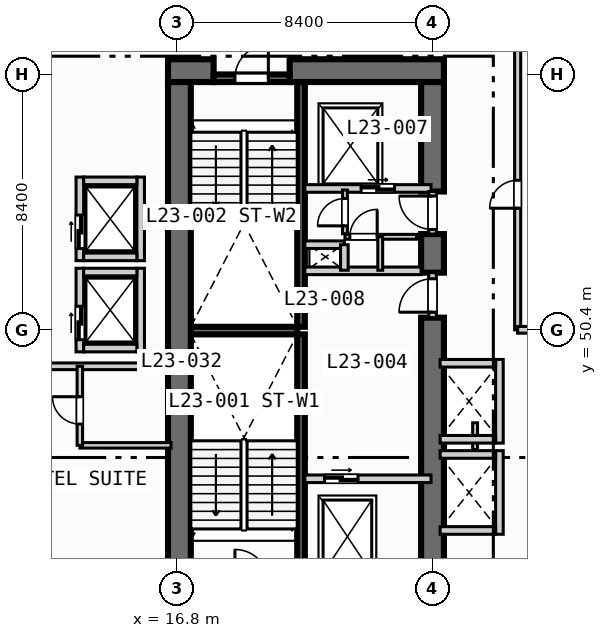
"""IFC4 building model, lengths in metres.
Left out: names, types, materials, properties, quantities, classifications, styles, units other than length and angle.
Written with IfcOpenShell. Run it as: python <this file> out.ifc"""

import sys

from ifc_helpers import new_model, si_unit, direction, frame, frame_2d, origin, place, context, subcontext, project, spatial, rectangle, extrude, element, fill, save


model = new_model("IFC4")
c1 = context("Model", 3, precision=1e-05, world=origin(), true_north=direction((0.0, 1.0)))
c2 = subcontext(c1, "Body", "Model", "MODEL_VIEW")
j1 = project(units=[si_unit("LENGTHUNIT", "METRE"), si_unit("PLANEANGLEUNIT", "RADIAN")], contexts=[c1])
p1 = place(None, origin())
s1 = spatial("IfcSite", under=j1, at=p1, CompositionType="ELEMENT")
p2 = place(p1, origin())
s2 = spatial("IfcBuilding", under=s1, at=p2, CompositionType="ELEMENT")
p3 = place(p2, frame((0.0, 0.0, 100.0)))
s3 = spatial("IfcBuildingStorey", under=s2, at=p3, CompositionType="ELEMENT", Elevation=100.0)
for number, where, z_axis, x_axis in (
    (1, (20.875, 42.2, 0.0), (0.0, 0.0, 1.0), (0.0, 1.0, 0.0)),
    (2, (20.875, 50.5, 0.0), (0.0, 0.0, 1.0), (0.0, 1.0, 0.0)),
):
    element("IfcWall", number, at=place(p3, frame(where, z_axis=z_axis, x_axis=x_axis)), inside=s3, PredefinedType="SOLIDWALL", context=c2, shape_type="SweptSolid", body=[
        extrude(rectangle(XDim=8.05, YDim=0.25, at=frame_2d((4.025, 0.0))), origin(), (0.0, 0.0, 1.0), 3.55),
    ])
p4 = place(p3, frame((17.25, 50.375, 0.0), z_axis=(0.0, 0.0, 1.0), x_axis=(1.0, 0.0, 0.0)))
e3 = element("IfcWall", 3, at=p4, inside=s3, PredefinedType="SOLIDWALL", context=c2, shape_type="SweptSolid", body=[
    extrude(rectangle(XDim=3.5, YDim=0.25, at=frame_2d((1.75, 0.0))), origin(), (0.0, 0.0, 1.0), 3.55),
])
p5 = place(p3, frame((16.5, 58.925, 0.0), z_axis=(0.0, 0.0, 1.0), x_axis=(1.0, 0.0, 0.0)))
e4 = element("IfcWall", 4, at=p5, inside=s3, PredefinedType="SHEAR", context=c2, shape_type="SweptSolid", body=[
    extrude(rectangle(XDim=1.5, YDim=0.75, at=frame_2d((0.75, 0.0))), origin(), (0.0, 0.0, 1.0), 3.55),
])
p6 = place(p3, frame((20.5, 58.925, 0.0), z_axis=(0.0, 0.0, 1.0), x_axis=(1.0, 0.0, 0.0)))
e5 = element("IfcWall", 5, at=p6, inside=s3, PredefinedType="SHEAR", context=c2, shape_type="SweptSolid", body=[
    extrude(rectangle(XDim=5.075, YDim=0.75, at=frame_2d((2.538, 0.0))), origin(), (0.0, 0.0, 1.0), 3.55),
])
p7 = place(p3, frame((16.875, 42.2, 0.0), z_axis=(0.0, 0.0, 1.0), x_axis=(0.0, 1.0, 0.0)))
e6 = element("IfcWall", 6, at=p7, inside=s3, PredefinedType="SHEAR", context=c2, shape_type="SweptSolid", body=[
    extrude(rectangle(XDim=16.35, YDim=0.75, at=frame_2d((8.175, 0.0))), origin(), (0.0, 0.0, 1.0), 3.55),
])
p8 = place(p3, frame((25.2, 42.2, 0.0), z_axis=(0.0, 0.0, 1.0), x_axis=(0.0, 1.0, 0.0)))
e7 = element("IfcWall", 7, at=p8, inside=s3, PredefinedType="SHEAR", context=c2, shape_type="SweptSolid", body=[
    extrude(rectangle(XDim=8.6, YDim=0.75, at=frame_2d((4.3, 0.0))), origin(), (0.0, 0.0, 1.0), 3.55),
])
p9 = place(p3, frame((25.2, 52.28, 0.0), z_axis=(0.0, 0.0, 1.0), x_axis=(0.0, 1.0, 0.0)))
e8 = element("IfcWall", 8, at=p9, inside=s3, PredefinedType="SHEAR", context=c2, shape_type="SweptSolid", body=[
    extrude(rectangle(XDim=1.27, YDim=0.75, at=frame_2d((0.635, 0.0))), origin(), (0.0, 0.0, 1.0), 3.55),
])
p10 = place(p3, frame((25.2, 54.95, 0.0), z_axis=(0.0, 0.0, 1.0), x_axis=(0.0, 1.0, 0.0)))
e9 = element("IfcWall", 9, at=p10, inside=s3, PredefinedType="SHEAR", context=c2, shape_type="SweptSolid", body=[
    extrude(rectangle(XDim=3.6, YDim=0.75, at=frame_2d((1.8, 0.0))), origin(), (0.0, 0.0, 1.0), 3.55),
])
p11 = place(p3, frame((18.0, 58.675, 0.0), z_axis=(0.0, 0.0, 1.0), x_axis=(1.0, 0.0, 0.0)))
e10 = element("IfcWall", 10, at=p11, inside=s3, PredefinedType="SOLIDWALL", context=c2, shape_type="SweptSolid", body=[
    extrude(rectangle(XDim=2.5, YDim=0.25, at=frame_2d((1.25, 0.0))), origin(), (0.0, 0.0, 1.0), 3.55),
])
p12 = place(p11, frame((0.7, 0.0, 0.0)))
e11 = element("IfcOpeningElement", 11, at=p12, cuts=e10, PredefinedType="OPENING", context=c2, shape_type="SweptSolid", body=[
    extrude(rectangle(XDim=1.1, YDim=2.15, at=frame_2d((0.55, 1.075))), frame((0.0, 0.135, 0.0), z_axis=(0.0, -1.0, 0.0), x_axis=(1.0, 0.0, 0.0)), (0.0, 0.0, 1.0), 0.27),
])
p13 = place(p3, frame((21.0, 45.5, 0.0), z_axis=(0.0, 0.0, 1.0), x_axis=(1.0, 0.0, 0.0)))
e12 = element("IfcWall", 12, at=p13, inside=s3, PredefinedType="SOLIDWALL", context=c2, shape_type="SweptSolid", body=[
    extrude(rectangle(XDim=4.15, YDim=0.25, at=frame_2d((2.075, 0.0))), origin(), (0.0, 0.0, 1.0), 3.55),
])
p14 = place(p13, frame((0.65, 0.0, 0.0)))
e13 = element("IfcOpeningElement", 13, at=p14, cuts=e12, PredefinedType="OPENING", context=c2, shape_type="SweptSolid", body=[
    extrude(rectangle(XDim=1.1, YDim=2.15, at=frame_2d((0.55, 1.075))), frame((0.0, 0.135, 0.0), z_axis=(0.0, -1.0, 0.0), x_axis=(1.0, 0.0, 0.0)), (0.0, 0.0, 1.0), 0.27),
])
p15 = place(p3, frame((25.2, 50.8, 0.0), z_axis=(0.0, 0.0, 1.0), x_axis=(0.0, 1.0, 0.0)))
e14 = element("IfcWall", 14, at=p15, inside=s3, PredefinedType="SOLIDWALL", context=c2, shape_type="SweptSolid", body=[
    extrude(rectangle(XDim=1.48, YDim=0.25, at=frame_2d((0.74, 0.0))), origin(), (0.0, 0.0, 1.0), 3.55),
])
p16 = place(p15, frame((0.18, 0.0, 0.0)))
e15 = element("IfcOpeningElement", 15, at=p16, cuts=e14, PredefinedType="OPENING", context=c2, shape_type="SweptSolid", body=[
    extrude(rectangle(XDim=1.1, YDim=2.15, at=frame_2d((0.55, 1.075))), frame((0.0, 0.135, 0.0), z_axis=(0.0, -1.0, 0.0), x_axis=(1.0, 0.0, 0.0)), (0.0, 0.0, 1.0), 0.27),
])
p17 = place(p3, frame((21.0, 52.34, 0.0), z_axis=(0.0, 0.0, 1.0), x_axis=(1.0, 0.0, 0.0)))
e16 = element("IfcWall", 16, at=p17, inside=s3, PredefinedType="SOLIDWALL", context=c2, shape_type="SweptSolid", body=[
    extrude(rectangle(XDim=3.825, YDim=0.25, at=frame_2d((1.913, 0.0))), origin(), (0.0, 0.0, 1.0), 3.55),
])
p18 = place(p3, frame((21.0, 55.05, 0.0), z_axis=(0.0, 0.0, 1.0), x_axis=(1.0, 0.0, 0.0)))
e17 = element("IfcWall", 17, at=p18, inside=s3, PredefinedType="SOLIDWALL", context=c2, shape_type="SweptSolid", body=[
    extrude(rectangle(XDim=4.15, YDim=0.25, at=frame_2d((2.075, 0.0))), origin(), (0.0, 0.0, 1.0), 3.55),
])
p19 = place(p18, frame((1.85, 0.0, 0.0)))
e18 = element("IfcOpeningElement", 18, at=p19, cuts=e17, PredefinedType="OPENING", context=c2, shape_type="SweptSolid", body=[
    extrude(rectangle(XDim=1.1, YDim=2.15, at=frame_2d((0.55, 1.075))), frame((0.0, 0.135, 0.0), z_axis=(0.0, -1.0, 0.0), x_axis=(1.0, 0.0, 0.0)), (0.0, 0.0, 1.0), 0.27),
])
p20 = place(p3, frame((25.2, 53.55, 0.0), z_axis=(0.0, 0.0, 1.0), x_axis=(0.0, 1.0, 0.0)))
e19 = element("IfcWall", 19, at=p20, inside=s3, PredefinedType="SOLIDWALL", context=c2, shape_type="SweptSolid", body=[
    extrude(rectangle(XDim=1.4, YDim=0.25, at=frame_2d((0.7, 0.0))), origin(), (0.0, 0.0, 1.0), 3.55),
])
p21 = place(p20, frame((0.15, 0.0, 0.0)))
e20 = element("IfcOpeningElement", 20, at=p21, cuts=e19, PredefinedType="OPENING", context=c2, shape_type="SweptSolid", body=[
    extrude(rectangle(XDim=1.1, YDim=2.15, at=frame_2d((0.55, 1.075))), frame((0.0, 0.135, 0.0), z_axis=(0.0, -1.0, 0.0), x_axis=(1.0, 0.0, 0.0)), (0.0, 0.0, 1.0), 0.27),
])
p22 = place(p3, frame((21.0, 53.2, 0.0), z_axis=(0.0, 0.0, 1.0), x_axis=(1.0, 0.0, 0.0)))
e21 = element("IfcWall", 21, at=p22, inside=s3, PredefinedType="SOLIDWALL", context=c2, shape_type="SweptSolid", body=[
    extrude(rectangle(XDim=1.3, YDim=0.25, at=frame_2d((0.65, 0.0))), origin(), (0.0, 0.0, 1.0), 3.55),
])
p23 = place(p3, frame((22.3, 52.36, 0.0), z_axis=(0.0, 0.0, 1.0), x_axis=(0.0, 1.0, 0.0)))
e22 = element("IfcWall", 22, at=p23, inside=s3, PredefinedType="SOLIDWALL", context=c2, shape_type="SweptSolid", body=[
    extrude(rectangle(XDim=0.84, YDim=0.25, at=frame_2d((0.42, 0.0))), origin(), (0.0, 0.0, 1.0), 3.55),
])
p24 = place(p3, frame((22.32, 53.56, 0.0), z_axis=(0.0, 0.0, 1.0), x_axis=(0.0, 1.0, 0.0)))
e23 = element("IfcWall", 23, at=p24, inside=s3, PredefinedType="PARTITIONING", context=c2, shape_type="SweptSolid", body=[
    extrude(rectangle(XDim=1.44, YDim=0.16, at=frame_2d((0.72, 0.0))), origin(), (0.0, 0.0, 1.0), 3.55),
])
p25 = place(p24, frame((0.26, 0.0, 0.0)))
e24 = element("IfcOpeningElement", 24, at=p25, cuts=e23, PredefinedType="OPENING", context=c2, shape_type="SweptSolid", body=[
    extrude(rectangle(XDim=0.9, YDim=2.1, at=frame_2d((0.45, 1.05))), frame((0.0, 0.09, 0.0), z_axis=(0.0, -1.0, 0.0), x_axis=(1.0, 0.0, 0.0)), (0.0, 0.0, 1.0), 0.18),
])
p26 = place(p3, frame((22.32, 53.46, 0.0), z_axis=(0.0, 0.0, 1.0), x_axis=(1.0, 0.0, 0.0)))
e25 = element("IfcWall", 25, at=p26, inside=s3, PredefinedType="PARTITIONING", context=c2, shape_type="SweptSolid", body=[
    extrude(rectangle(XDim=2.36, YDim=0.16, at=frame_2d((1.18, 0.0))), origin(), (0.0, 0.0, 1.0), 3.55),
])
p27 = place(p26, frame((0.16, 0.0, 0.0)))
e26 = element("IfcOpeningElement", 26, at=p27, cuts=e25, PredefinedType="OPENING", context=c2, shape_type="SweptSolid", body=[
    extrude(rectangle(XDim=0.9, YDim=2.1, at=frame_2d((0.45, 1.05))), frame((0.0, 0.09, 0.0), z_axis=(0.0, -1.0, 0.0), x_axis=(1.0, 0.0, 0.0)), (0.0, 0.0, 1.0), 0.18),
])
p28 = place(p3, frame((23.48, 52.36, 0.0), z_axis=(0.0, 0.0, 1.0), x_axis=(0.0, 1.0, 0.0)))
e27 = element("IfcWall", 27, at=p28, inside=s3, PredefinedType="PARTITIONING", context=c2, shape_type="SweptSolid", body=[
    extrude(rectangle(XDim=1.1, YDim=0.16, at=frame_2d((0.55, 0.0))), origin(), (0.0, 0.0, 1.0), 3.55),
])
p29 = place(p3, frame((13.6, 49.675, 0.0), z_axis=(0.0, 0.0, 1.0), x_axis=(0.0, 1.0, 0.0)))
e28 = element("IfcWall", 28, at=p29, inside=s3, PredefinedType="SOLIDWALL", context=c2, shape_type="SweptSolid", body=[
    extrude(rectangle(XDim=2.75, YDim=0.25, at=frame_2d((1.375, 0.0))), origin(), (0.0, 0.0, 1.0), 3.55),
])
p30 = place(p29, frame((0.4, 0.0, 0.0)))
e29 = element("IfcOpeningElement", 29, at=p30, cuts=e28, PredefinedType="OPENING", context=c2, shape_type="SweptSolid", body=[
    extrude(rectangle(XDim=1.1, YDim=2.15, at=frame_2d((0.55, 1.075))), frame((0.0, 0.135, 0.0), z_axis=(0.0, -1.0, 0.0), x_axis=(1.0, 0.0, 0.0)), (0.0, 0.0, 1.0), 0.27),
])
p31 = place(p3, frame((15.6, 49.675, 0.0), z_axis=(0.0, 0.0, 1.0), x_axis=(0.0, 1.0, 0.0)))
e30 = element("IfcWall", 30, at=p31, inside=s3, PredefinedType="SOLIDWALL", context=c2, shape_type="SweptSolid", body=[
    extrude(rectangle(XDim=2.75, YDim=0.25, at=frame_2d((1.375, 0.0))), origin(), (0.0, 0.0, 1.0), 3.55),
])
for number, where, z_axis, x_axis in (
    (31, (13.725, 49.8, 0.0), (0.0, 0.0, 1.0), (1.0, 0.0, 0.0)),
    (32, (13.725, 52.3, 0.0), (0.0, 0.0, 1.0), (1.0, 0.0, 0.0)),
):
    element("IfcWall", number, at=place(p3, frame(where, z_axis=z_axis, x_axis=x_axis)), inside=s3, PredefinedType="SOLIDWALL", context=c2, shape_type="SweptSolid", body=[
        extrude(rectangle(XDim=1.75, YDim=0.25, at=frame_2d((0.875, 0.0))), origin(), (0.0, 0.0, 1.0), 3.55),
    ])
p32 = place(p3, frame((13.6, 52.675, 0.0), z_axis=(0.0, 0.0, 1.0), x_axis=(0.0, 1.0, 0.0)))
e33 = element("IfcWall", 33, at=p32, inside=s3, PredefinedType="SOLIDWALL", context=c2, shape_type="SweptSolid", body=[
    extrude(rectangle(XDim=2.75, YDim=0.25, at=frame_2d((1.375, 0.0))), origin(), (0.0, 0.0, 1.0), 3.55),
])
p33 = place(p32, frame((0.4, 0.0, 0.0)))
e34 = element("IfcOpeningElement", 34, at=p33, cuts=e33, PredefinedType="OPENING", context=c2, shape_type="SweptSolid", body=[
    extrude(rectangle(XDim=1.1, YDim=2.15, at=frame_2d((0.55, 1.075))), frame((0.0, 0.135, 0.0), z_axis=(0.0, -1.0, 0.0), x_axis=(1.0, 0.0, 0.0)), (0.0, 0.0, 1.0), 0.27),
])
p34 = place(p3, frame((15.6, 52.675, 0.0), z_axis=(0.0, 0.0, 1.0), x_axis=(0.0, 1.0, 0.0)))
e35 = element("IfcWall", 35, at=p34, inside=s3, PredefinedType="SOLIDWALL", context=c2, shape_type="SweptSolid", body=[
    extrude(rectangle(XDim=2.75, YDim=0.25, at=frame_2d((1.375, 0.0))), origin(), (0.0, 0.0, 1.0), 3.55),
])
for number, where, z_axis, x_axis in (
    (36, (13.725, 52.8, 0.0), (0.0, 0.0, 1.0), (1.0, 0.0, 0.0)),
    (37, (13.725, 55.3, 0.0), (0.0, 0.0, 1.0), (1.0, 0.0, 0.0)),
):
    element("IfcWall", number, at=place(p3, frame(where, z_axis=z_axis, x_axis=x_axis)), inside=s3, PredefinedType="SOLIDWALL", context=c2, shape_type="SweptSolid", body=[
        extrude(rectangle(XDim=1.75, YDim=0.25, at=frame_2d((0.875, 0.0))), origin(), (0.0, 0.0, 1.0), 3.55),
    ])
p35 = place(p3, frame((27.4, 43.675, 0.0), z_axis=(0.0, 0.0, 1.0), x_axis=(0.0, 1.0, 0.0)))
e38 = element("IfcWall", 38, at=p35, inside=s3, PredefinedType="SOLIDWALL", context=c2, shape_type="SweptSolid", body=[
    extrude(rectangle(XDim=2.75, YDim=0.25, at=frame_2d((1.375, 0.0))), origin(), (0.0, 0.0, 1.0), 3.55),
])
for number, where, z_axis, x_axis in (
    (39, (25.45, 43.8, 0.0), (0.0, 0.0, 1.0), (1.0, 0.0, 0.0)),
    (40, (25.45, 46.3, 0.0), (0.0, 0.0, 1.0), (1.0, 0.0, 0.0)),
):
    element("IfcWall", number, at=place(p3, frame(where, z_axis=z_axis, x_axis=x_axis)), inside=s3, PredefinedType="SOLIDWALL", context=c2, shape_type="SweptSolid", body=[
        extrude(rectangle(XDim=1.825, YDim=0.25, at=frame_2d((0.913, 0.0))), origin(), (0.0, 0.0, 1.0), 3.55),
    ])
p36 = place(p3, frame((26.6, 46.46, 0.0), z_axis=(0.0, 0.0, 1.0), x_axis=(0.0, 1.0, 0.0)))
e41 = element("IfcWall", 41, at=p36, inside=s3, PredefinedType="PARTITIONING", context=c2, shape_type="SweptSolid", body=[
    extrude(rectangle(XDim=0.88, YDim=0.16, at=frame_2d((0.44, 0.0))), origin(), (0.0, 0.0, 1.0), 3.55),
])
p37 = place(p3, frame((27.4, 46.675, 0.0), z_axis=(0.0, 0.0, 1.0), x_axis=(0.0, 1.0, 0.0)))
e42 = element("IfcWall", 42, at=p37, inside=s3, PredefinedType="SOLIDWALL", context=c2, shape_type="SweptSolid", body=[
    extrude(rectangle(XDim=2.75, YDim=0.25, at=frame_2d((1.375, 0.0))), origin(), (0.0, 0.0, 1.0), 3.55),
])
for number, where, z_axis, x_axis in (
    (43, (25.45, 46.8, 0.0), (0.0, 0.0, 1.0), (1.0, 0.0, 0.0)),
    (44, (25.45, 49.3, 0.0), (0.0, 0.0, 1.0), (1.0, 0.0, 0.0)),
):
    element("IfcWall", number, at=place(p3, frame(where, z_axis=z_axis, x_axis=x_axis)), inside=s3, PredefinedType="SOLIDWALL", context=c2, shape_type="SweptSolid", body=[
        extrude(rectangle(XDim=1.825, YDim=0.25, at=frame_2d((0.913, 0.0))), origin(), (0.0, 0.0, 1.0), 3.55),
    ])
p38 = place(p3, frame((0.35, 49.2, 0.0), z_axis=(0.0, 0.0, 1.0), x_axis=(1.0, 0.0, 0.0)))
e45 = element("IfcWall", 45, at=p38, inside=s3, PredefinedType="PARTITIONING", context=c2, shape_type="SweptSolid", body=[
    extrude(rectangle(XDim=16.25, YDim=0.22, at=frame_2d((8.125, 0.0))), origin(), (0.0, 0.0, 1.0), 3.55),
])
p39 = place(p3, frame((13.6, 46.6, 0.0), z_axis=(0.0, 0.0, 1.0), x_axis=(1.0, 0.0, 0.0)))
e46 = element("IfcWall", 46, at=p39, inside=s3, PredefinedType="PLUMBINGWALL", context=c2, shape_type="SweptSolid", body=[
    extrude(rectangle(XDim=3.0, YDim=0.18, at=frame_2d((1.5, 0.0))), origin(), (0.0, 0.0, 1.0), 3.55),
])
p40 = place(p3, frame((13.6, 46.6, 0.0), z_axis=(0.0, 0.0, 1.0), x_axis=(0.0, 1.0, 0.0)))
e47 = element("IfcWall", 47, at=p40, inside=s3, PredefinedType="PLUMBINGWALL", context=c2, shape_type="SweptSolid", body=[
    extrude(rectangle(XDim=2.6, YDim=0.18, at=frame_2d((1.3, 0.0))), origin(), (0.0, 0.0, 1.0), 3.55),
])
p41 = place(p40, frame((0.7, 0.0, 0.0)))
e48 = element("IfcOpeningElement", 48, at=p41, cuts=e47, PredefinedType="OPENING", context=c2, shape_type="SweptSolid", body=[
    extrude(rectangle(XDim=0.9, YDim=2.1, at=frame_2d((0.45, 1.05))), frame((0.0, 0.1, 0.0), z_axis=(0.0, -1.0, 0.0), x_axis=(1.0, 0.0, 0.0)), (0.0, 0.0, 1.0), 0.2),
])
p42 = place(p3, frame((28.0, 50.4, 0.0), z_axis=(0.0, 0.0, 1.0), x_axis=(0.0, 1.0, 0.0)))
e49 = element("IfcWall", 49, at=p42, inside=s3, PredefinedType="PARTITIONING", context=c2, shape_type="SweptSolid", body=[
    extrude(rectangle(XDim=38.6, YDim=0.2, at=frame_2d((19.3, 0.0))), origin(), (0.0, 0.0, 1.0), 3.55),
])
p43 = place(p42, frame((4.0, 0.0, 0.0)))
e50 = element("IfcOpeningElement", 50, at=p43, cuts=e49, PredefinedType="OPENING", context=c2, shape_type="SweptSolid", body=[
    extrude(rectangle(XDim=0.92, YDim=2.1, at=frame_2d((0.46, 1.05))), frame((0.0, 0.11, 0.0), z_axis=(0.0, -1.0, 0.0), x_axis=(1.0, 0.0, 0.0)), (0.0, 0.0, 1.0), 0.22),
])
p44 = place(p3, frame((28.0, 50.4, 0.0), z_axis=(0.0, 0.0, 1.0), x_axis=(1.0, 0.0, 0.0)))
e51 = element("IfcWall", 51, at=p44, inside=s3, PredefinedType="PARTITIONING", context=c2, shape_type="SweptSolid", body=[
    extrude(rectangle(XDim=5.3, YDim=0.22, at=frame_2d((2.65, 0.0))), origin(), (0.0, 0.0, 1.0), 2.8),
])
p45 = place(p12, origin())
e52 = element("IfcDoor", 52, at=p45, inside=s3, OperationType="SINGLE_SWING_RIGHT", PredefinedType="DOOR", context=c2, shape_type="SweptSolid", body=[
    extrude(rectangle(XDim=1.1, YDim=2.15, at=frame_2d((0.55, 1.075))), frame((0.0, 0.025, 0.0), z_axis=(0.0, -1.0, 0.0), x_axis=(1.0, 0.0, 0.0)), (0.0, 0.0, 1.0), 0.05),
])
fill(e11, e52)
p46 = place(p14, origin())
e53 = element("IfcDoor", 53, at=p46, inside=s3, OperationType="SLIDING_TO_LEFT", PredefinedType="DOOR", context=c2, shape_type="SweptSolid", body=[
    extrude(rectangle(XDim=1.1, YDim=2.15, at=frame_2d((0.55, 1.075))), frame((0.0, 0.025, 0.0), z_axis=(0.0, -1.0, 0.0), x_axis=(1.0, 0.0, 0.0)), (0.0, 0.0, 1.0), 0.05),
])
fill(e13, e53)
p47 = place(p16, origin())
e54 = element("IfcDoor", 54, at=p47, inside=s3, OperationType="SINGLE_SWING_LEFT", PredefinedType="DOOR", context=c2, shape_type="SweptSolid", body=[
    extrude(rectangle(XDim=1.1, YDim=2.15, at=frame_2d((0.55, 1.075))), frame((0.0, 0.025, 0.0), z_axis=(0.0, -1.0, 0.0), x_axis=(1.0, 0.0, 0.0)), (0.0, 0.0, 1.0), 0.05),
])
fill(e15, e54)
p48 = place(p19, origin())
e55 = element("IfcDoor", 55, at=p48, inside=s3, OperationType="SLIDING_TO_LEFT", PredefinedType="DOOR", context=c2, shape_type="SweptSolid", body=[
    extrude(rectangle(XDim=1.1, YDim=2.15, at=frame_2d((0.55, 1.075))), frame((0.0, 0.025, 0.0), z_axis=(0.0, -1.0, 0.0), x_axis=(1.0, 0.0, 0.0)), (0.0, 0.0, 1.0), 0.05),
])
fill(e18, e55)
p49 = place(p21, origin())
e56 = element("IfcDoor", 56, at=p49, inside=s3, OperationType="SINGLE_SWING_RIGHT", PredefinedType="DOOR", context=c2, shape_type="SweptSolid", body=[
    extrude(rectangle(XDim=1.1, YDim=2.15, at=frame_2d((0.55, 1.075))), frame((0.0, 0.025, 0.0), z_axis=(0.0, -1.0, 0.0), x_axis=(1.0, 0.0, 0.0)), (0.0, 0.0, 1.0), 0.05),
])
fill(e20, e56)
p50 = place(p25, origin())
e57 = element("IfcDoor", 57, at=p50, inside=s3, OperationType="SINGLE_SWING_LEFT", PredefinedType="DOOR", context=c2, shape_type="SweptSolid", body=[
    extrude(rectangle(XDim=0.9, YDim=2.1, at=frame_2d((0.45, 1.05))), frame((0.0, 0.025, 0.0), z_axis=(0.0, -1.0, 0.0), x_axis=(1.0, 0.0, 0.0)), (0.0, 0.0, 1.0), 0.05),
])
fill(e24, e57)
p51 = place(p27, origin())
e58 = element("IfcDoor", 58, at=p51, inside=s3, OperationType="SINGLE_SWING_RIGHT", PredefinedType="DOOR", context=c2, shape_type="SweptSolid", body=[
    extrude(rectangle(XDim=0.9, YDim=2.1, at=frame_2d((0.45, 1.05))), frame((0.0, 0.025, 0.0), z_axis=(0.0, -1.0, 0.0), x_axis=(1.0, 0.0, 0.0)), (0.0, 0.0, 1.0), 0.05),
])
fill(e26, e58)
p52 = place(p30, origin())
e59 = element("IfcDoor", 59, at=p52, inside=s3, OperationType="SLIDING_TO_LEFT", PredefinedType="DOOR", context=c2, shape_type="SweptSolid", body=[
    extrude(rectangle(XDim=1.1, YDim=2.15, at=frame_2d((0.55, 1.075))), frame((0.0, 0.025, 0.0), z_axis=(0.0, -1.0, 0.0), x_axis=(1.0, 0.0, 0.0)), (0.0, 0.0, 1.0), 0.05),
])
fill(e29, e59)
p53 = place(p33, origin())
e60 = element("IfcDoor", 60, at=p53, inside=s3, OperationType="SLIDING_TO_LEFT", PredefinedType="DOOR", context=c2, shape_type="SweptSolid", body=[
    extrude(rectangle(XDim=1.1, YDim=2.15, at=frame_2d((0.55, 1.075))), frame((0.0, 0.025, 0.0), z_axis=(0.0, -1.0, 0.0), x_axis=(1.0, 0.0, 0.0)), (0.0, 0.0, 1.0), 0.05),
])
fill(e34, e60)
p54 = place(p41, origin())
e61 = element("IfcDoor", 61, at=p54, inside=s3, OperationType="SINGLE_SWING_RIGHT", PredefinedType="DOOR", context=c2, shape_type="SweptSolid", body=[
    extrude(rectangle(XDim=0.9, YDim=2.1, at=frame_2d((0.45, 1.05))), frame((0.0, 0.025, 0.0), z_axis=(0.0, -1.0, 0.0), x_axis=(1.0, 0.0, 0.0)), (0.0, 0.0, 1.0), 0.05),
])
fill(e48, e61)
p55 = place(p43, origin())
e62 = element("IfcDoor", 62, at=p55, inside=s3, OperationType="SINGLE_SWING_LEFT", PredefinedType="DOOR", context=c2, shape_type="SweptSolid", body=[
    extrude(rectangle(XDim=0.92, YDim=2.1, at=frame_2d((0.46, 1.05))), frame((0.0, 0.025, 0.0), z_axis=(0.0, -1.0, 0.0), x_axis=(1.0, 0.0, 0.0)), (0.0, 0.0, 1.0), 0.05),
])
fill(e50, e62)
save(model, sys.argv[1])
